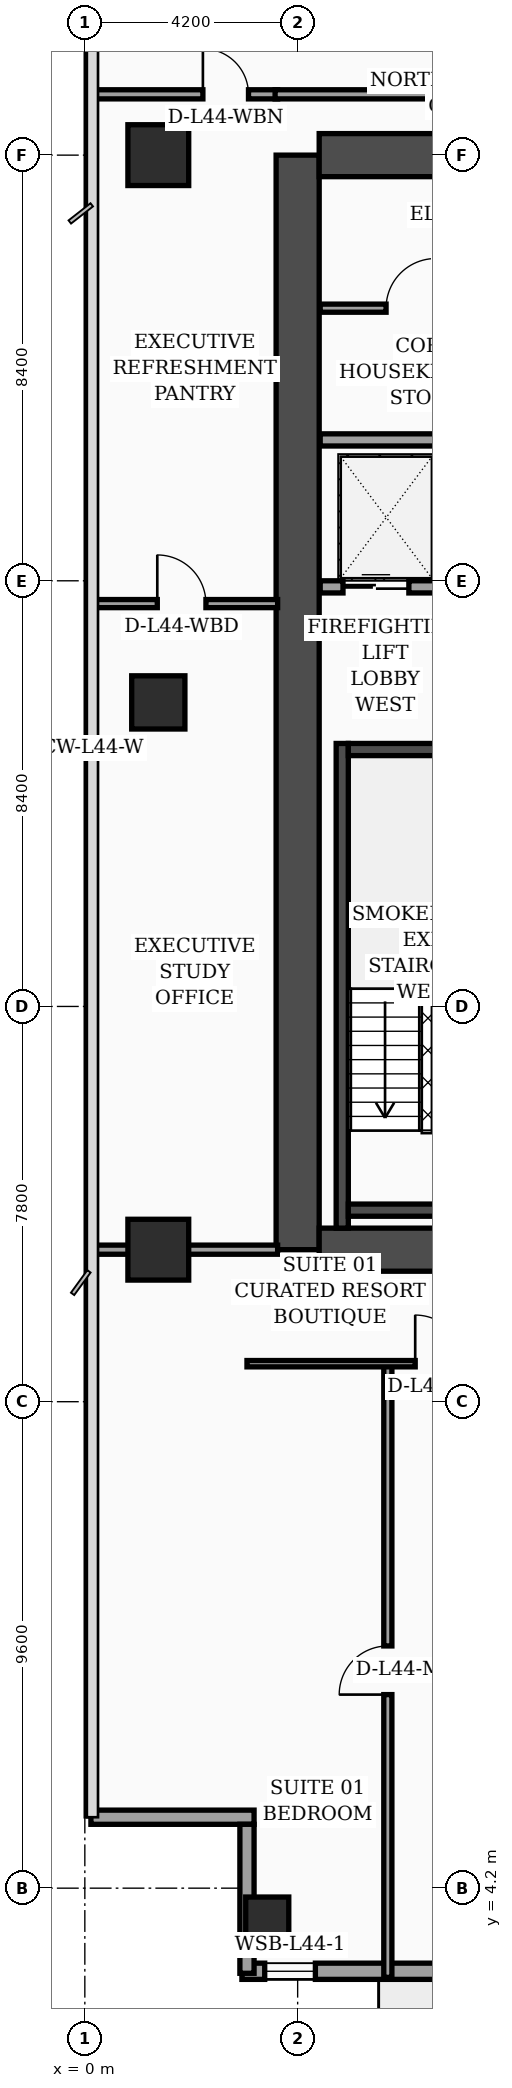
"""IFC4 building model, lengths in metres.
Left out: names, types, materials, properties, quantities, classifications, styles, units other than length and angle.
Written with IfcOpenShell. Run it as: python <this file> out.ifc"""

import sys

from ifc_helpers import new_model, si_unit, direction, frame, frame_2d, origin, origin_2d, place, context, subcontext, project, spatial, rectangle, hollow_rectangle, extrude, element, fill, save


model = new_model("IFC4")
c1 = context("Model", 3, precision=1e-05, world=origin(), true_north=direction((0.0, 1.0)))
c2 = subcontext(c1, "Body", "Model", "MODEL_VIEW")
j1 = project(units=[si_unit("LENGTHUNIT", "METRE"), si_unit("PLANEANGLEUNIT", "RADIAN")], contexts=[c1])
p1 = place(None, origin())
s1 = spatial("IfcSite", under=j1, at=p1, CompositionType="ELEMENT")
p2 = place(p1, origin())
s2 = spatial("IfcBuilding", under=s1, at=p2, CompositionType="ELEMENT")
p3 = place(p2, frame((0.0, 0.0, 178.9)))
s3 = spatial("IfcBuildingStorey", under=s2, at=p3, CompositionType="ELEMENT", Elevation=178.9)
p4 = place(p3, frame((4.2, 16.8, 0.0), z_axis=(0.0, 0.0, 1.0), x_axis=(0.0, 1.0, 0.0)))
e1 = element("IfcWall", 1, at=p4, inside=s3, PredefinedType="SHEAR", context=c2, shape_type="SweptSolid", body=[
    extrude(rectangle(XDim=21.6, YDim=0.85, at=frame_2d((10.8, 0.0))), origin(), (0.0, 0.0, 1.0), 3.56),
])
for number, where, z_axis, x_axis in (
    (2, (4.625, 38.4, 0.0), (0.0, 0.0, 1.0), (1.0, 0.0, 0.0)),
    (3, (4.625, 16.8, 0.0), (0.0, 0.0, 1.0), (1.0, 0.0, 0.0)),
):
    element("IfcWall", number, at=place(p3, frame(where, z_axis=z_axis, x_axis=x_axis)), inside=s3, PredefinedType="SHEAR", context=c2, shape_type="SweptSolid", body=[
        extrude(rectangle(XDim=9.95, YDim=0.85, at=frame_2d((4.975, 0.0))), origin(), (0.0, 0.0, 1.0), 3.56),
    ])
p5 = place(p3, frame((5.08, 17.225, 0.0), z_axis=(0.0, 0.0, 1.0), x_axis=(0.0, 1.0, 0.0)))
e4 = element("IfcWall", 4, at=p5, inside=s3, PredefinedType="SOLIDWALL", context=c2, shape_type="SweptSolid", body=[
    extrude(rectangle(XDim=9.565, YDim=0.24, at=frame_2d((4.782, 0.0))), origin(), (0.0, 0.0, 1.0), 3.56),
])
for number, where, z_axis, x_axis in (
    (5, (5.2, 17.58, 0.0), (0.0, 0.0, 1.0), (1.0, 0.0, 0.0)),
    (6, (5.2, 26.67, 0.0), (0.0, 0.0, 1.0), (1.0, 0.0, 0.0)),
):
    element("IfcWall", number, at=place(p3, frame(where, z_axis=z_axis, x_axis=x_axis)), inside=s3, PredefinedType="SOLIDWALL", context=c2, shape_type="SweptSolid", body=[
        extrude(rectangle(XDim=3.1, YDim=0.24, at=frame_2d((1.55, 0.0))), origin(), (0.0, 0.0, 1.0), 3.56),
    ])
p6 = place(p3, frame((3.6, 3.6, 0.0), z_axis=(0.0, 0.0, 1.0), x_axis=(1.0, 0.0, 0.0)))
e7 = element("IfcColumn", 7, at=p6, inside=s3, PredefinedType="COLUMN", context=c2, shape_type="SweptSolid", body=[
    extrude(hollow_rectangle(XDim=0.85, YDim=0.85, WallThickness=0.036, at=origin_2d()), origin(), (0.0, 0.0, 1.0), 3.56),
])
p7 = place(p3, frame((1.45, 16.8, 0.0), z_axis=(0.0, 0.0, 1.0), x_axis=(1.0, 0.0, 0.0)))
e8 = element("IfcColumn", 8, at=p7, inside=s3, PredefinedType="COLUMN", context=c2, shape_type="SweptSolid", body=[
    extrude(rectangle(XDim=1.2, YDim=1.2, at=origin_2d()), origin(), (0.0, 0.0, 1.0), 3.56),
])
p8 = place(p3, frame((1.45, 27.6, 0.0), z_axis=(0.0, 0.0, 1.0), x_axis=(1.0, 0.0, 0.0)))
e9 = element("IfcColumn", 9, at=p8, inside=s3, PredefinedType="COLUMN", context=c2, shape_type="SweptSolid", body=[
    extrude(rectangle(XDim=1.05, YDim=1.05, at=origin_2d()), origin(), (0.0, 0.0, 1.0), 3.56),
])
p9 = place(p3, frame((1.45, 38.4, 0.0), z_axis=(0.0, 0.0, 1.0), x_axis=(1.0, 0.0, 0.0)))
e10 = element("IfcColumn", 10, at=p9, inside=s3, PredefinedType="COLUMN", context=c2, shape_type="SweptSolid", body=[
    extrude(rectangle(XDim=1.2, YDim=1.2, at=origin_2d()), origin(), (0.0, 0.0, 1.0), 3.56),
])
p10 = place(p3, frame((3.1, 2.56, 0.0), z_axis=(0.0, 0.0, 1.0), x_axis=(1.0, 0.0, 0.0)))
e11 = element("IfcWall", 11, at=p10, inside=s3, PredefinedType="SOLIDWALL", context=c2, shape_type="SweptSolid", body=[
    extrude(rectangle(XDim=8.0, YDim=0.32, at=frame_2d((4.0, 0.0))), origin(), (0.0, 0.0, 1.0), 3.56),
])
p11 = place(p10, frame((0.45, 0.0, 0.75)))
e12 = element("IfcOpeningElement", 12, at=p11, cuts=e11, PredefinedType="OPENING", context=c2, shape_type="SweptSolid", body=[
    extrude(rectangle(XDim=1.0, YDim=1.6, at=frame_2d((0.5, 0.8))), frame((0.0, 0.17, 0.0), z_axis=(0.0, -1.0, 0.0), x_axis=(1.0, 0.0, 0.0)), (0.0, 0.0, 1.0), 0.34),
])
p12 = place(p10, frame((4.2, 0.0, 0.0)))
e13 = element("IfcOpeningElement", 13, at=p12, cuts=e11, PredefinedType="OPENING", context=c2, shape_type="SweptSolid", body=[
    extrude(rectangle(XDim=1.4, YDim=2.25, at=frame_2d((0.7, 1.125))), frame((0.0, 0.17, 0.0), z_axis=(0.0, -1.0, 0.0), x_axis=(1.0, 0.0, 0.0)), (0.0, 0.0, 1.0), 0.34),
])
p13 = place(p3, frame((0.12, 5.6, 0.0), z_axis=(0.0, 0.0, 1.0), x_axis=(1.0, 0.0, 0.0)))
e14 = element("IfcWall", 14, at=p13, inside=s3, PredefinedType="SOLIDWALL", context=c2, shape_type="SweptSolid", body=[
    extrude(rectangle(XDim=3.22, YDim=0.28, at=frame_2d((1.61, 0.0))), origin(), (0.0, 0.0, 1.0), 2.94),
])
p14 = place(p3, frame((3.2, 5.46, 0.0), z_axis=(0.0, 0.0, 1.0), x_axis=(0.0, -1.0, 0.0)))
e15 = element("IfcWall", 15, at=p14, inside=s3, PredefinedType="SOLIDWALL", context=c2, shape_type="SweptSolid", body=[
    extrude(rectangle(XDim=2.94, YDim=0.28, at=frame_2d((1.47, 0.0))), origin(), (0.0, 0.0, 1.0), 2.94),
])
p15 = place(p3, frame((4.645, 29.88, 0.0), z_axis=(0.0, 0.0, 1.0), x_axis=(1.0, 0.0, 0.0)))
e16 = element("IfcWall", 16, at=p15, inside=s3, PredefinedType="SOLIDWALL", context=c2, shape_type="SweptSolid", body=[
    extrude(rectangle(XDim=4.775, YDim=0.24, at=frame_2d((2.387, 0.0))), origin(), (0.0, 0.0, 1.0), 3.56),
])
p16 = place(p15, frame((0.45, 0.0, 0.0)))
e17 = element("IfcOpeningElement", 17, at=p16, cuts=e16, PredefinedType="OPENING", context=c2, shape_type="SweptSolid", body=[
    extrude(rectangle(XDim=1.3, YDim=2.35, at=frame_2d((0.65, 1.175))), frame((0.0, 0.13, 0.0), z_axis=(0.0, -1.0, 0.0), x_axis=(1.0, 0.0, 0.0)), (0.0, 0.0, 1.0), 0.26),
])
p17 = place(p3, frame((4.645, 32.78, 0.0), z_axis=(0.0, 0.0, 1.0), x_axis=(1.0, 0.0, 0.0)))
e18 = element("IfcWall", 18, at=p17, inside=s3, PredefinedType="SOLIDWALL", context=c2, shape_type="SweptSolid", body=[
    extrude(rectangle(XDim=4.775, YDim=0.24, at=frame_2d((2.387, 0.0))), origin(), (0.0, 0.0, 1.0), 3.19),
])
p18 = place(p3, frame((4.645, 35.38, 0.0), z_axis=(0.0, 0.0, 1.0), x_axis=(1.0, 0.0, 0.0)))
e19 = element("IfcWall", 19, at=p18, inside=s3, PredefinedType="PARTITIONING", context=c2, shape_type="SweptSolid", body=[
    extrude(rectangle(XDim=4.775, YDim=0.16, at=frame_2d((2.387, 0.0))), origin(), (0.0, 0.0, 1.0), 3.56),
])
p19 = place(p18, frame((1.3, 0.0, 0.0)))
e20 = element("IfcOpeningElement", 20, at=p19, cuts=e19, PredefinedType="OPENING", context=c2, shape_type="SweptSolid", body=[
    extrude(rectangle(XDim=0.98, YDim=2.15, at=frame_2d((0.49, 1.075))), frame((0.0, 0.09, 0.0), z_axis=(0.0, -1.0, 0.0), x_axis=(1.0, 0.0, 0.0)), (0.0, 0.0, 1.0), 0.18),
])
p20 = place(p3, frame((0.08, 29.55, 0.0), z_axis=(0.0, 0.0, 1.0), x_axis=(1.0, 0.0, 0.0)))
e21 = element("IfcWall", 21, at=p20, inside=s3, PredefinedType="PARTITIONING", context=c2, shape_type="SweptSolid", body=[
    extrude(rectangle(XDim=3.725, YDim=0.16, at=frame_2d((1.862, 0.0))), origin(), (0.0, 0.0, 1.0), 3.04),
])
p21 = place(p20, frame((1.35, 0.0, 0.0)))
e22 = element("IfcOpeningElement", 22, at=p21, cuts=e21, PredefinedType="OPENING", context=c2, shape_type="SweptSolid", body=[
    extrude(rectangle(XDim=0.96, YDim=2.2, at=frame_2d((0.48, 1.1))), frame((0.0, 0.09, 0.0), z_axis=(0.0, -1.0, 0.0), x_axis=(1.0, 0.0, 0.0)), (0.0, 0.0, 1.0), 0.18),
])
p22 = place(p3, frame((0.08, 16.8, 0.0), z_axis=(0.0, 0.0, 1.0), x_axis=(1.0, 0.0, 0.0)))
e23 = element("IfcWall", 23, at=p22, inside=s3, PredefinedType="PARTITIONING", context=c2, shape_type="SweptSolid", body=[
    extrude(rectangle(XDim=3.725, YDim=0.18, at=frame_2d((1.862, 0.0))), origin(), (0.0, 0.0, 1.0), 2.94),
])
p23 = place(p3, frame((0.08, 39.6, 0.0), z_axis=(0.0, 0.0, 1.0), x_axis=(1.0, 0.0, 0.0)))
e24 = element("IfcWall", 24, at=p23, inside=s3, PredefinedType="PARTITIONING", context=c2, shape_type="SweptSolid", body=[
    extrude(rectangle(XDim=3.725, YDim=0.18, at=frame_2d((1.862, 0.0))), origin(), (0.0, 0.0, 1.0), 2.94),
])
p24 = place(p23, frame((2.25, 0.0, 0.0)))
e25 = element("IfcOpeningElement", 25, at=p24, cuts=e24, PredefinedType="OPENING", context=c2, shape_type="SweptSolid", body=[
    extrude(rectangle(XDim=0.9, YDim=2.15, at=frame_2d((0.45, 1.075))), frame((0.0, 0.1, 0.0), z_axis=(0.0, -1.0, 0.0), x_axis=(1.0, 0.0, 0.0)), (0.0, 0.0, 1.0), 0.2),
])
p25 = place(p3, frame((5.98, 2.44, 0.0), z_axis=(0.0, 0.0, 1.0), x_axis=(0.0, 1.0, 0.0)))
e26 = element("IfcWall", 26, at=p25, inside=s3, PredefinedType="PARTITIONING", context=c2, shape_type="SweptSolid", body=[
    extrude(rectangle(XDim=12.11, YDim=0.16, at=frame_2d((6.055, 0.0))), origin(), (0.0, 0.0, 1.0), 3.04),
])
p26 = place(p25, frame((5.58, 0.0, 0.0)))
e27 = element("IfcOpeningElement", 27, at=p26, cuts=e26, PredefinedType="OPENING", context=c2, shape_type="SweptSolid", body=[
    extrude(rectangle(XDim=0.96, YDim=2.2, at=frame_2d((0.48, 1.1))), frame((0.0, 0.09, 0.0), z_axis=(0.0, -1.0, 0.0), x_axis=(1.0, 0.0, 0.0)), (0.0, 0.0, 1.0), 0.18),
])
p27 = place(p3, frame((3.2, 14.55, 0.0), z_axis=(0.0, 0.0, 1.0), x_axis=(1.0, 0.0, 0.0)))
e28 = element("IfcWall", 28, at=p27, inside=s3, PredefinedType="PARTITIONING", context=c2, shape_type="SweptSolid", body=[
    extrude(rectangle(XDim=9.8, YDim=0.125, at=frame_2d((4.9, 0.0))), origin(), (0.0, 0.0, 1.0), 2.94),
])
p28 = place(p27, frame((3.32, 0.0, 0.0)))
e29 = element("IfcOpeningElement", 29, at=p28, cuts=e28, PredefinedType="OPENING", context=c2, shape_type="SweptSolid", body=[
    extrude(rectangle(XDim=0.96, YDim=2.2, at=frame_2d((0.48, 1.1))), frame((0.0, 0.073, 0.0), z_axis=(0.0, -1.0, 0.0), x_axis=(1.0, 0.0, 0.0)), (0.0, 0.0, 1.0), 0.145),
])
p29 = place(p27, frame((7.89, 0.0, 0.0)))
e30 = element("IfcOpeningElement", 30, at=p29, cuts=e28, PredefinedType="OPENING", context=c2, shape_type="SweptSolid", body=[
    extrude(rectangle(XDim=0.9, YDim=2.15, at=frame_2d((0.45, 1.075))), frame((0.0, 0.073, 0.0), z_axis=(0.0, -1.0, 0.0), x_axis=(1.0, 0.0, 0.0)), (0.0, 0.0, 1.0), 0.145),
])
p30 = place(p3, frame((3.755, 39.6, 0.0), z_axis=(0.0, 0.0, 1.0), x_axis=(1.0, 0.0, 0.0)))
e31 = element("IfcWall", 31, at=p30, inside=s3, PredefinedType="PARTITIONING", context=c2, shape_type="SweptSolid", body=[
    extrude(rectangle(XDim=11.395, YDim=0.18, at=frame_2d((5.698, 0.0))), origin(), (0.0, 0.0, 1.0), 2.94),
])
p31 = place(p11, origin())
e32 = element("IfcWindow", 32, at=p31, inside=s3, PartitioningType="SINGLE_PANEL", PredefinedType="WINDOW", context=c2, shape_type="SweptSolid", body=[
    extrude(rectangle(XDim=1.0, YDim=1.6, at=frame_2d((0.5, 0.8))), frame((0.0, 0.03, 0.0), z_axis=(0.0, -1.0, 0.0), x_axis=(1.0, 0.0, 0.0)), (0.0, 0.0, 1.0), 0.06),
])
fill(e12, e32)
p32 = place(p16, origin())
e33 = element("IfcDoor", 33, at=p32, inside=s3, OperationType="DOUBLE_DOOR_SLIDING", PredefinedType="DOOR", context=c2, shape_type="SweptSolid", body=[
    extrude(rectangle(XDim=1.3, YDim=2.35, at=frame_2d((0.65, 1.175))), frame((0.0, 0.025, 0.0), z_axis=(0.0, -1.0, 0.0), x_axis=(1.0, 0.0, 0.0)), (0.0, 0.0, 1.0), 0.05),
])
fill(e17, e33)
p33 = place(p19, origin())
e34 = element("IfcDoor", 34, at=p33, inside=s3, OperationType="SINGLE_SWING_RIGHT", PredefinedType="DOOR", context=c2, shape_type="SweptSolid", body=[
    extrude(rectangle(XDim=0.98, YDim=2.15, at=frame_2d((0.49, 1.075))), frame((0.0, 0.025, 0.0), z_axis=(0.0, -1.0, 0.0), x_axis=(1.0, 0.0, 0.0)), (0.0, 0.0, 1.0), 0.05),
])
fill(e20, e34)
p34 = place(p21, origin())
e35 = element("IfcDoor", 35, at=p34, inside=s3, OperationType="SINGLE_SWING_LEFT", PredefinedType="DOOR", context=c2, shape_type="SweptSolid", body=[
    extrude(rectangle(XDim=0.96, YDim=2.2, at=frame_2d((0.48, 1.1))), frame((0.0, 0.025, 0.0), z_axis=(0.0, -1.0, 0.0), x_axis=(1.0, 0.0, 0.0)), (0.0, 0.0, 1.0), 0.05),
])
fill(e22, e35)
p35 = place(p24, origin())
e36 = element("IfcDoor", 36, at=p35, inside=s3, OperationType="SINGLE_SWING_LEFT", PredefinedType="DOOR", context=c2, shape_type="SweptSolid", body=[
    extrude(rectangle(XDim=0.9, YDim=2.15, at=frame_2d((0.45, 1.075))), frame((0.0, 0.025, 0.0), z_axis=(0.0, -1.0, 0.0), x_axis=(1.0, 0.0, 0.0)), (0.0, 0.0, 1.0), 0.05),
])
fill(e25, e36)
p36 = place(p26, origin())
e37 = element("IfcDoor", 37, at=p36, inside=s3, OperationType="SINGLE_SWING_LEFT", PredefinedType="DOOR", context=c2, shape_type="SweptSolid", body=[
    extrude(rectangle(XDim=0.96, YDim=2.2, at=frame_2d((0.48, 1.1))), frame((0.0, 0.025, 0.0), z_axis=(0.0, -1.0, 0.0), x_axis=(1.0, 0.0, 0.0)), (0.0, 0.0, 1.0), 0.05),
])
fill(e27, e37)
p37 = place(p28, origin())
e38 = element("IfcDoor", 38, at=p37, inside=s3, OperationType="SINGLE_SWING_LEFT", PredefinedType="DOOR", context=c2, shape_type="SweptSolid", body=[
    extrude(rectangle(XDim=0.96, YDim=2.2, at=frame_2d((0.48, 1.1))), frame((0.0, 0.025, 0.0), z_axis=(0.0, -1.0, 0.0), x_axis=(1.0, 0.0, 0.0)), (0.0, 0.0, 1.0), 0.05),
])
fill(e29, e38)
save(model, sys.argv[1])
